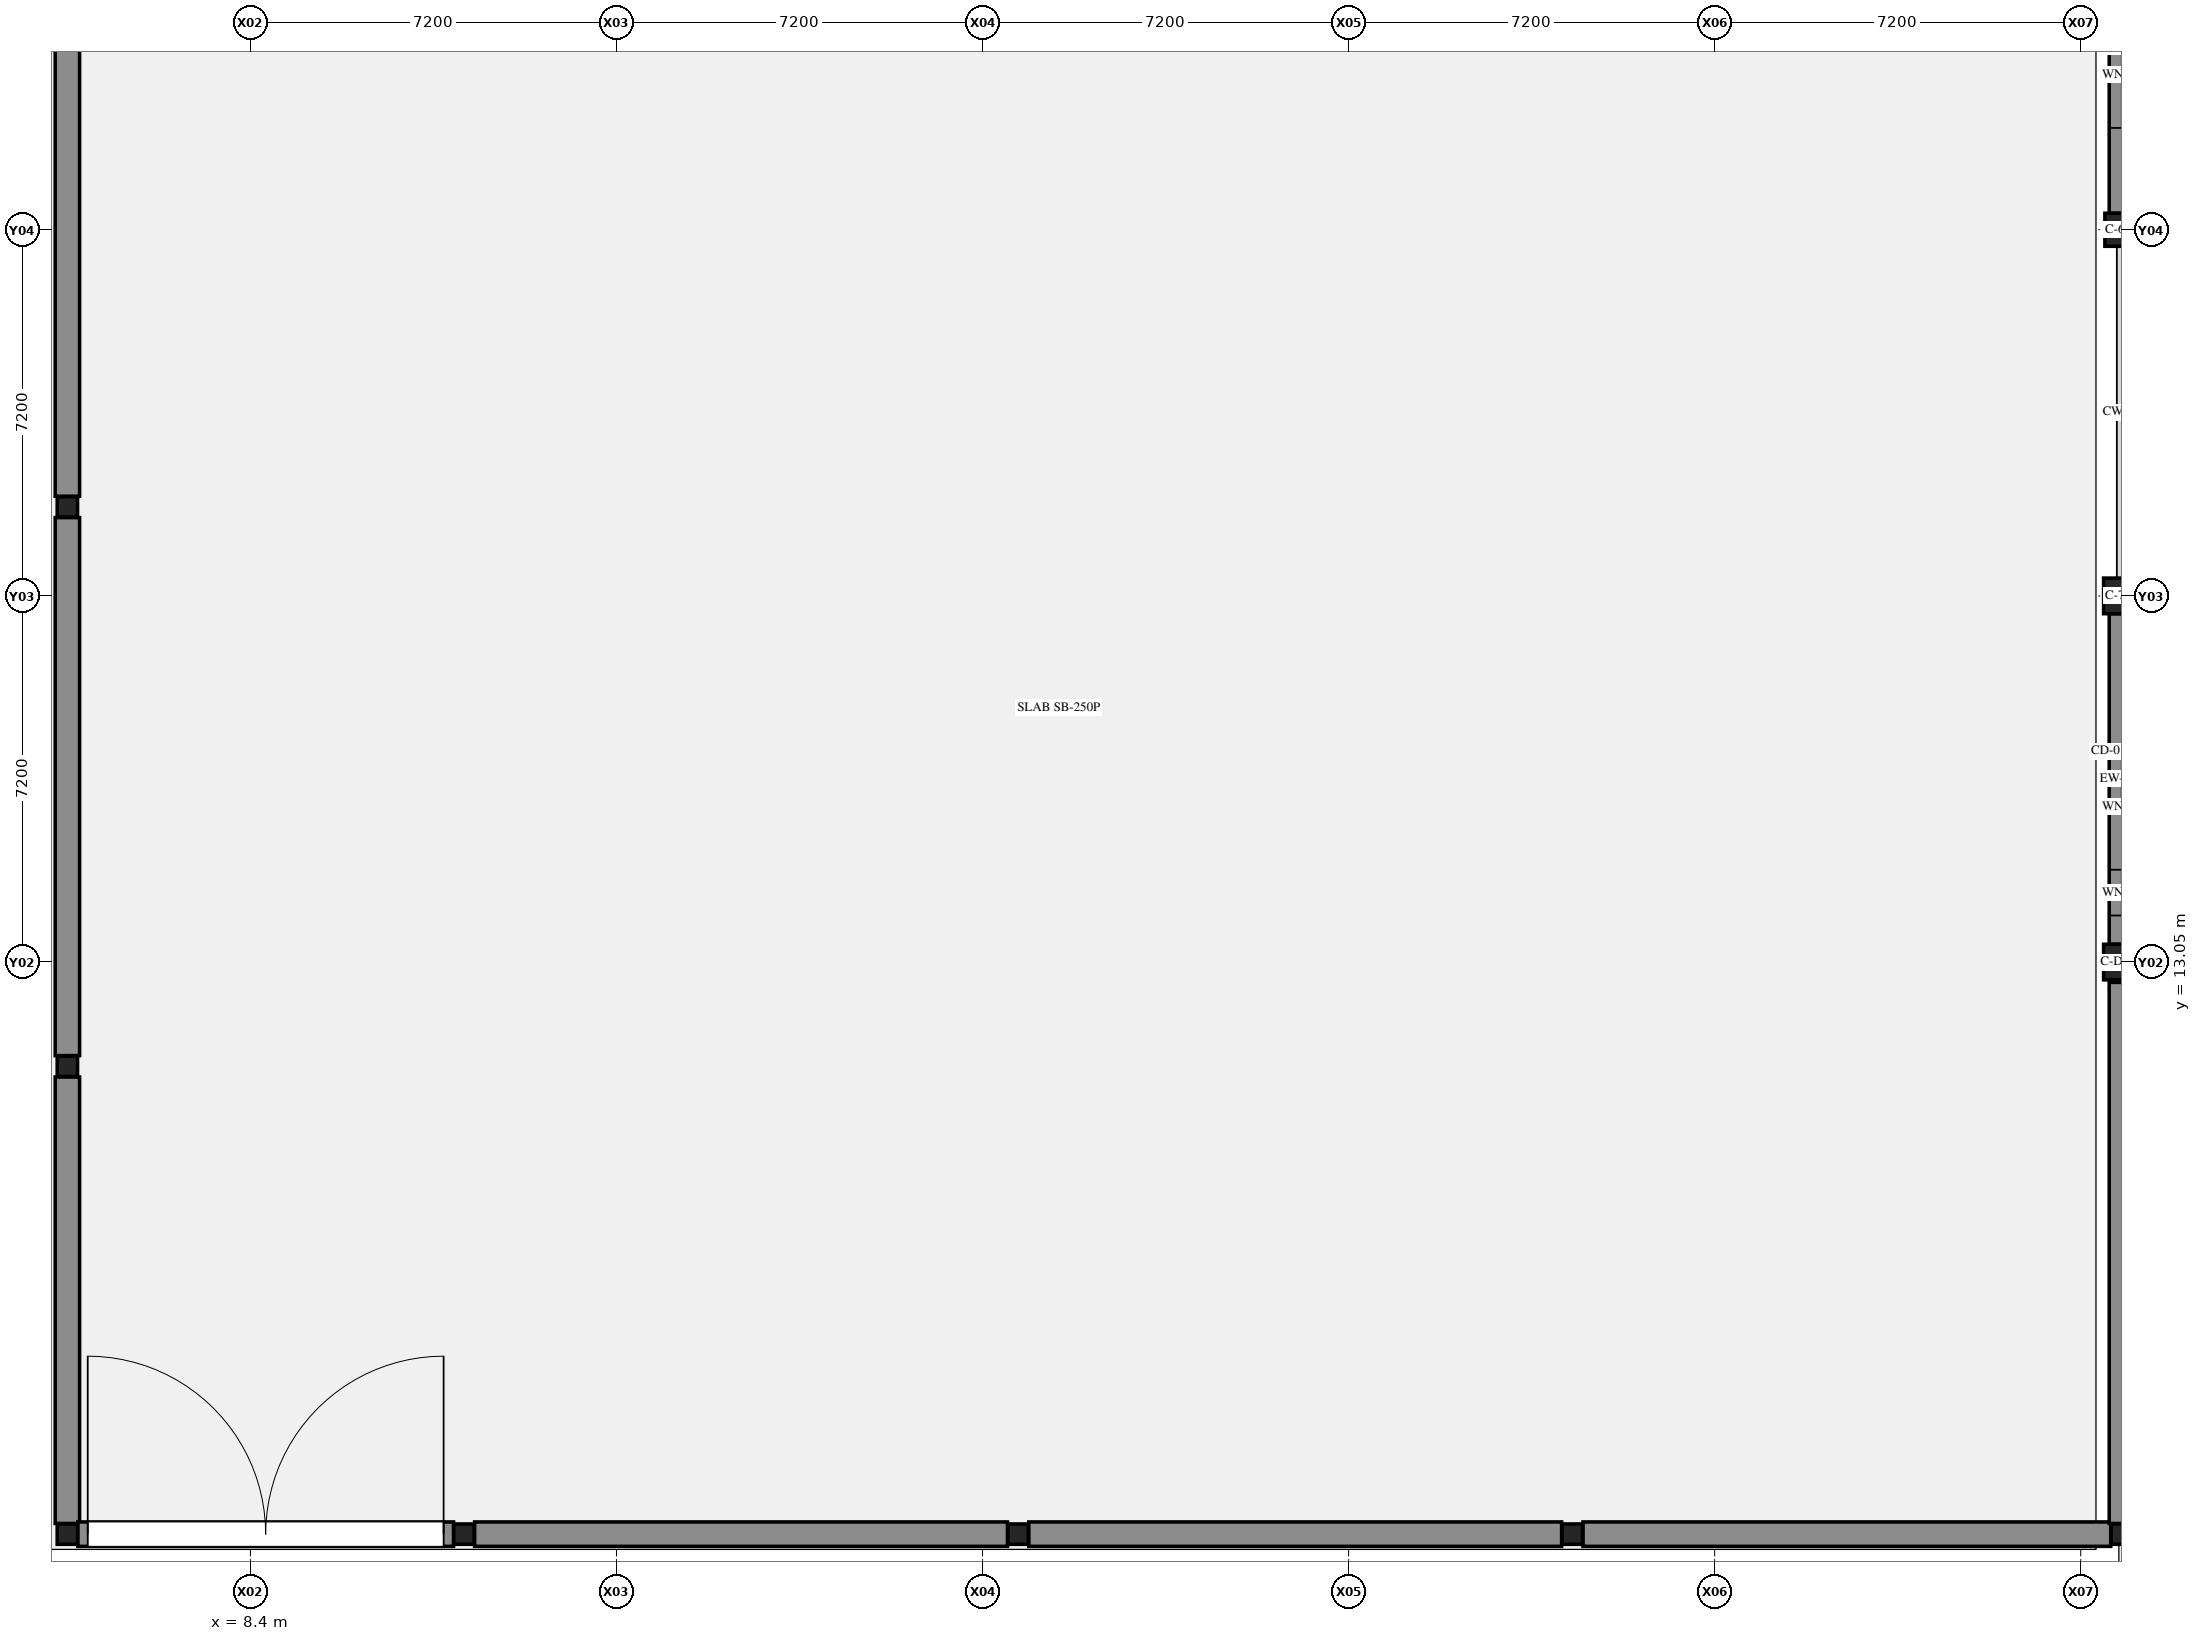
"""IFC4 building model, lengths in metres.
Left out: names, types, materials, properties, quantities, classifications, styles, units other than length and angle.
Written with IfcOpenShell. Run it as: python <this file> out.ifc"""

import sys

from ifc_helpers import new_model, si_unit, direction, frame, frame_2d, origin, origin_2d, place, context, subcontext, project, spatial, rectangle, circle, extrude, element, fill, save


model = new_model("IFC4")
c1 = context("Model", 3, precision=1e-05, world=origin(), true_north=direction((0.0, 1.0)))
c2 = subcontext(c1, "Body", "Model", "MODEL_VIEW")
j1 = project(units=[si_unit("LENGTHUNIT", "METRE"), si_unit("PLANEANGLEUNIT", "RADIAN")], contexts=[c1])
p1 = place(None, origin())
s1 = spatial("IfcSite", under=j1, at=p1, CompositionType="ELEMENT")
p2 = place(p1, origin())
s2 = spatial("IfcBuilding", under=s1, at=p2, CompositionType="ELEMENT")
p3 = place(p2, origin())
s3 = spatial("IfcBuildingStorey", under=s2, at=p3, CompositionType="ELEMENT", Elevation=0.0)
p4 = place(p3, frame((45.2, 13.05, 0.0), z_axis=(0.0, 0.0, 1.0), x_axis=(1.0, 0.0, 0.0)))
e1 = element("IfcColumn", 1, at=p4, inside=s3, PredefinedType="COLUMN", context=c2, shape_type="SweptSolid", body=[
    extrude(circle(Radius=0.35, at=origin_2d()), origin(), (0.0, 0.0, 1.0), 4.8),
])
p5 = place(p3, frame((45.2, 20.25, 0.0), z_axis=(0.0, 0.0, 1.0), x_axis=(1.0, 0.0, 0.0)))
e2 = element("IfcColumn", 2, at=p5, inside=s3, PredefinedType="COLUMN", context=c2, shape_type="SweptSolid", body=[
    extrude(rectangle(XDim=0.7, YDim=0.7, at=origin_2d()), origin(), (0.0, 0.0, 1.0), 4.8),
])
p6 = place(p3, frame((45.2, 27.45, 0.0), z_axis=(0.0, 0.0, 1.0), x_axis=(1.0, 0.0, 0.0)))
e3 = element("IfcColumn", 3, at=p6, inside=s3, PredefinedType="COLUMN", context=c2, shape_type="SweptSolid", body=[
    extrude(rectangle(XDim=0.65, YDim=0.65, at=origin_2d()), origin(), (0.0, 0.0, 1.0), 4.8),
])
p7 = place(p3, frame((45.2, 13.4, 0.0), z_axis=(0.0, 0.0, 1.0), x_axis=(0.0, 1.0, 0.0)))
e4 = element("IfcWall", 4, at=p7, inside=s3, PredefinedType="SOLIDWALL", context=c2, shape_type="SweptSolid", body=[
    extrude(rectangle(XDim=6.5, YDim=0.48, at=frame_2d((3.25, 0.0))), origin(), (0.0, 0.0, 1.0), 3.73),
])
p8 = place(p7, frame((0.565, 0.0, 0.95)))
e5 = element("IfcOpeningElement", 5, at=p8, cuts=e4, PredefinedType="OPENING", context=c2, shape_type="SweptSolid", body=[
    extrude(rectangle(XDim=0.9, YDim=1.2, at=frame_2d((0.45, 0.6))), frame((0.0, 0.25, 0.0), z_axis=(0.0, -1.0, 0.0), x_axis=(1.0, 0.0, 0.0)), (0.0, 0.0, 1.0), 0.5),
])
p9 = place(p7, frame((2.8, 0.0, 0.95)))
e6 = element("IfcOpeningElement", 6, at=p9, cuts=e4, PredefinedType="OPENING", context=c2, shape_type="SweptSolid", body=[
    extrude(rectangle(XDim=0.9, YDim=1.2, at=frame_2d((0.45, 0.6))), frame((0.0, 0.25, 0.0), z_axis=(0.0, -1.0, 0.0), x_axis=(1.0, 0.0, 0.0)), (0.0, 0.0, 1.0), 0.5),
])
p10 = place(p3, frame((45.2, 27.775, 0.0), z_axis=(0.0, 0.0, 1.0), x_axis=(0.0, 1.0, 0.0)))
e7 = element("IfcWall", 7, at=p10, inside=s3, PredefinedType="SOLIDWALL", context=c2, shape_type="SweptSolid", body=[
    extrude(rectangle(XDim=6.575, YDim=0.48, at=frame_2d((3.288, 0.0))), origin(), (0.0, 0.0, 1.0), 3.73),
])
p11 = place(p10, frame((1.677, 0.0, 0.9)))
e8 = element("IfcOpeningElement", 8, at=p11, cuts=e7, PredefinedType="OPENING", context=c2, shape_type="SweptSolid", body=[
    extrude(rectangle(XDim=2.1, YDim=1.8, at=frame_2d((1.05, 0.9))), frame((0.0, 0.25, 0.0), z_axis=(0.0, -1.0, 0.0), x_axis=(1.0, 0.0, 0.0)), (0.0, 0.0, 1.0), 0.5),
])
for number, where, z_axis, x_axis in (
    (9, (4.8, 22.0, 0.0), (0.0, 0.0, 1.0), (1.0, 0.0, 0.0)),
    (10, (4.8, 11.0, 0.0), (0.0, 0.0, 1.0), (1.0, 0.0, 0.0)),
    (11, (4.8, 1.8, 0.0), (0.0, 0.0, 1.0), (1.0, 0.0, 0.0)),
    (12, (12.6, 1.8, 0.0), (0.0, 0.0, 1.0), (1.0, 0.0, 0.0)),
    (13, (23.5, 1.8, 0.0), (0.0, 0.0, 1.0), (1.0, 0.0, 0.0)),
    (14, (34.4, 1.8, 0.0), (0.0, 0.0, 1.0), (1.0, 0.0, 0.0)),
    (15, (45.2, 1.8, 0.0), (0.0, 0.0, 1.0), (1.0, 0.0, 0.0)),
):
    element("IfcColumn", number, at=place(p3, frame(where, z_axis=z_axis, x_axis=x_axis)), inside=s3, PredefinedType="COLUMN", context=c2, shape_type="SweptSolid", body=[
        extrude(rectangle(XDim=0.4, YDim=0.4, at=origin_2d()), origin(), (0.0, 0.0, 1.0), 3.1),
    ])
p12 = place(p3, frame((4.8, 34.44, 0.0), z_axis=(0.0, 0.0, 1.0), x_axis=(0.0, -1.0, 0.0)))
e16 = element("IfcWall", 16, at=p12, inside=s3, PredefinedType="SOLIDWALL", context=c2, shape_type="SweptSolid", body=[
    extrude(rectangle(XDim=12.23, YDim=0.48, at=frame_2d((6.115, 0.0))), origin(), (0.0, 0.0, 1.0), 2.75),
])
p13 = place(p3, frame((4.8, 21.79, 0.0), z_axis=(0.0, 0.0, 1.0), x_axis=(0.0, -1.0, 0.0)))
e17 = element("IfcWall", 17, at=p13, inside=s3, PredefinedType="SOLIDWALL", context=c2, shape_type="SweptSolid", body=[
    extrude(rectangle(XDim=10.58, YDim=0.48, at=frame_2d((5.29, 0.0))), origin(), (0.0, 0.0, 1.0), 2.75),
])
p14 = place(p3, frame((4.8, 10.79, 0.0), z_axis=(0.0, 0.0, 1.0), x_axis=(0.0, -1.0, 0.0)))
e18 = element("IfcWall", 18, at=p14, inside=s3, PredefinedType="SOLIDWALL", context=c2, shape_type="SweptSolid", body=[
    extrude(rectangle(XDim=8.78, YDim=0.48, at=frame_2d((4.39, 0.0))), origin(), (0.0, 0.0, 1.0), 2.75),
])
for number, where, z_axis, x_axis in (
    (19, (12.81, 1.8, 0.0), (0.0, 0.0, 1.0), (1.0, 0.0, 0.0)),
    (20, (23.71, 1.8, 0.0), (0.0, 0.0, 1.0), (1.0, 0.0, 0.0)),
):
    element("IfcWall", number, at=place(p3, frame(where, z_axis=z_axis, x_axis=x_axis)), inside=s3, PredefinedType="SOLIDWALL", context=c2, shape_type="SweptSolid", body=[
        extrude(rectangle(XDim=10.48, YDim=0.48, at=frame_2d((5.24, 0.0))), origin(), (0.0, 0.0, 1.0), 2.75),
    ])
p15 = place(p3, frame((34.61, 1.8, 0.0), z_axis=(0.0, 0.0, 1.0), x_axis=(1.0, 0.0, 0.0)))
e21 = element("IfcWall", 21, at=p15, inside=s3, PredefinedType="SOLIDWALL", context=c2, shape_type="SweptSolid", body=[
    extrude(rectangle(XDim=10.38, YDim=0.48, at=frame_2d((5.19, 0.0))), origin(), (0.0, 0.0, 1.0), 2.75),
])
p16 = place(p3, frame((45.2, 2.01, 0.0), z_axis=(0.0, 0.0, 1.0), x_axis=(0.0, 1.0, 0.0)))
e22 = element("IfcWall", 22, at=p16, inside=s3, PredefinedType="SOLIDWALL", context=c2, shape_type="SweptSolid", body=[
    extrude(rectangle(XDim=10.64, YDim=0.48, at=frame_2d((5.32, 0.0))), origin(), (0.0, 0.0, 1.0), 2.75),
])
p17 = place(p3, frame((5.005, 1.8, 0.0), z_axis=(0.0, 0.0, 1.0), x_axis=(1.0, 0.0, 0.0)))
e23 = element("IfcWall", 23, at=p17, inside=s3, PredefinedType="SOLIDWALL", context=c2, shape_type="SweptSolid", body=[
    extrude(rectangle(XDim=7.39, YDim=0.48, at=frame_2d((3.695, 0.0))), origin(), (0.0, 0.0, 1.0), 2.75),
])
p18 = place(p17, frame((0.195, 0.0, 0.0)))
e24 = element("IfcOpeningElement", 24, at=p18, cuts=e23, PredefinedType="OPENING", context=c2, shape_type="SweptSolid", body=[
    extrude(rectangle(XDim=7.0, YDim=2.4, at=frame_2d((3.5, 1.2))), frame((0.0, 0.25, 0.0), z_axis=(0.0, -1.0, 0.0), x_axis=(1.0, 0.0, 0.0)), (0.0, 0.0, 1.0), 0.5),
])
p19 = place(p8, origin())
e25 = element("IfcWindow", 25, at=p19, inside=s3, PartitioningType="SINGLE_PANEL", PredefinedType="WINDOW", context=c2, shape_type="SweptSolid", body=[
    extrude(rectangle(XDim=0.9, YDim=1.2, at=frame_2d((0.45, 0.6))), frame((0.0, 0.03, 0.0), z_axis=(0.0, -1.0, 0.0), x_axis=(1.0, 0.0, 0.0)), (0.0, 0.0, 1.0), 0.06),
])
fill(e5, e25)
p20 = place(p9, origin())
e26 = element("IfcWindow", 26, at=p20, inside=s3, PartitioningType="SINGLE_PANEL", PredefinedType="WINDOW", context=c2, shape_type="SweptSolid", body=[
    extrude(rectangle(XDim=0.9, YDim=1.2, at=frame_2d((0.45, 0.6))), frame((0.0, 0.03, 0.0), z_axis=(0.0, -1.0, 0.0), x_axis=(1.0, 0.0, 0.0)), (0.0, 0.0, 1.0), 0.06),
])
fill(e6, e26)
p21 = place(p11, origin())
e27 = element("IfcWindow", 27, at=p21, inside=s3, PartitioningType="SINGLE_PANEL", PredefinedType="WINDOW", context=c2, shape_type="SweptSolid", body=[
    extrude(rectangle(XDim=2.1, YDim=1.8, at=frame_2d((1.05, 0.9))), frame((0.0, 0.03, 0.0), z_axis=(0.0, -1.0, 0.0), x_axis=(1.0, 0.0, 0.0)), (0.0, 0.0, 1.0), 0.06),
])
fill(e8, e27)
p22 = place(p18, origin())
e28 = element("IfcDoor", 28, at=p22, inside=s3, OperationType="DOUBLE_DOOR_SINGLE_SWING", PredefinedType="GATE", context=c2, shape_type="SweptSolid", body=[
    extrude(rectangle(XDim=7.0, YDim=2.4, at=frame_2d((3.5, 1.2))), frame((0.0, 0.025, 0.0), z_axis=(0.0, -1.0, 0.0), x_axis=(1.0, 0.0, 0.0)), (0.0, 0.0, 1.0), 0.05),
])
fill(e24, e28)
save(model, sys.argv[1])
